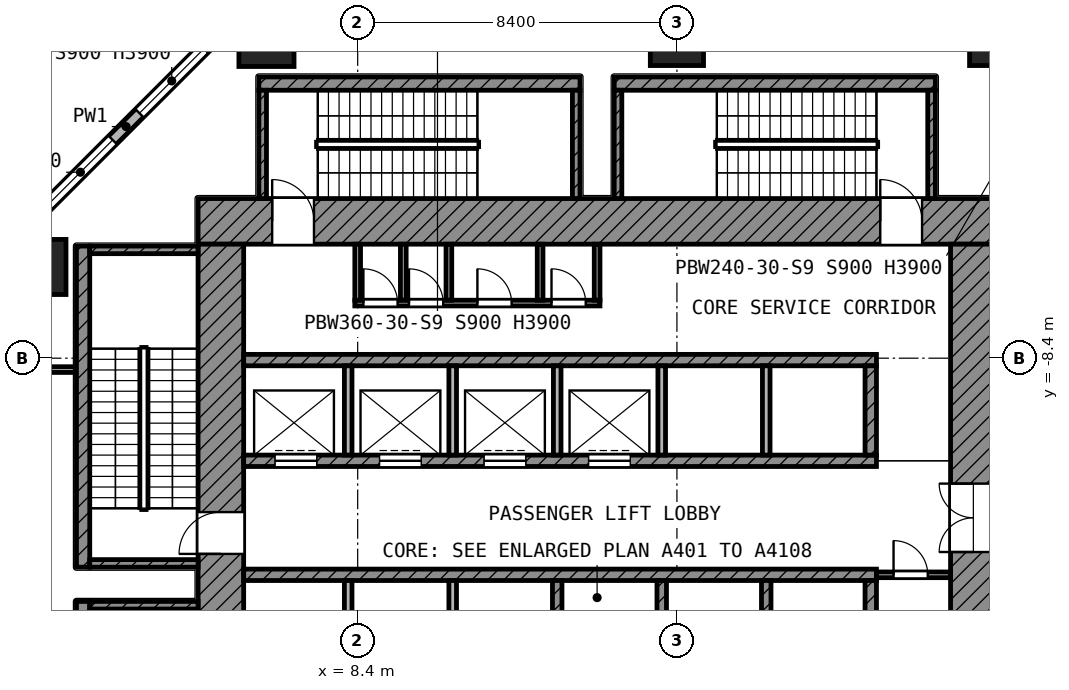
"""IFC4 building model, lengths in metres.
Left out: names, types, materials, properties, quantities, classifications, styles, units other than length and angle.
Written with IfcOpenShell. Run it as: python <this file> out.ifc"""

import sys

from ifc_helpers import new_model, si_unit, direction, frame, frame_2d, origin, origin_2d, place, context, subcontext, project, spatial, rectangle, extrude, element, fill, save


model = new_model("IFC4")
c1 = context("Model", 3, precision=1e-05, world=origin(), true_north=direction((0.0, 1.0)))
c2 = subcontext(c1, "Body", "Model", "MODEL_VIEW")
j1 = project(units=[si_unit("LENGTHUNIT", "METRE"), si_unit("PLANEANGLEUNIT", "RADIAN")], contexts=[c1])
p1 = place(None, origin())
s1 = spatial("IfcSite", under=j1, at=p1, CompositionType="ELEMENT")
p2 = place(p1, origin())
s2 = spatial("IfcBuilding", under=s1, at=p2, CompositionType="ELEMENT")
p3 = place(p2, frame((0.0, 0.0, 7.0)))
s3 = spatial("IfcBuildingStorey", under=s2, at=p3, CompositionType="ELEMENT", Elevation=7.0)
p4 = place(p3, frame((6.0, 0.0, 0.0), z_axis=(0.0, 0.0, 1.0), x_axis=(1.0, 0.0, 0.0)))
e1 = element("IfcColumn", 1, at=p4, inside=s3, PredefinedType="COLUMN", context=c2, shape_type="SweptSolid", body=[
    extrude(rectangle(XDim=1.45, YDim=1.45, at=origin_2d()), origin(), (0.0, 0.0, 1.0), 5.6),
])
for number, where, z_axis, x_axis in (
    (2, (16.8, 0.0, 0.0), (0.0, 0.0, 1.0), (1.0, 0.0, 0.0)),
    (3, (25.2, 0.0, 0.0), (0.0, 0.0, 1.0), (1.0, 0.0, 0.0)),
):
    element("IfcColumn", number, at=place(p3, frame(where, z_axis=z_axis, x_axis=x_axis)), inside=s3, PredefinedType="COLUMN", context=c2, shape_type="SweptSolid", body=[
        extrude(rectangle(XDim=1.4, YDim=1.4, at=origin_2d()), origin(), (0.0, 0.0, 1.0), 5.6),
    ])
p5 = place(p3, frame((0.0, -6.0, 0.0), z_axis=(0.0, 0.0, 1.0), x_axis=(1.0, 0.0, 0.0)))
e4 = element("IfcColumn", 4, at=p5, inside=s3, PredefinedType="COLUMN", context=c2, shape_type="SweptSolid", body=[
    extrude(rectangle(XDim=1.45, YDim=1.45, at=origin_2d()), origin(), (0.0, 0.0, 1.0), 5.6),
])
p6 = place(p3, frame((5.262, 0.65, 0.0), z_axis=(0.0, 0.0, 1.0), x_axis=(-0.707106781187, -0.707106781187, 0.0)))
e5 = element("IfcWall", 5, at=p6, inside=s3, PredefinedType="SOLIDWALL", context=c2, shape_type="SweptSolid", body=[
    extrude(rectangle(XDim=8.361, YDim=0.3, at=frame_2d((4.181, 0.0))), origin(), (0.0, 0.0, 1.0), 5.25),
])
p7 = place(p6, frame((1.282, 0.0, 0.9)))
e6 = element("IfcOpeningElement", 6, at=p7, cuts=e5, PredefinedType="OPENING", context=c2, shape_type="SweptSolid", body=[
    extrude(rectangle(XDim=2.4, YDim=3.0, at=frame_2d((1.2, 1.5))), frame((0.0, 0.16, 0.0), z_axis=(0.0, -1.0, 0.0), x_axis=(1.0, 0.0, 0.0)), (0.0, 0.0, 1.0), 0.32),
])
p8 = place(p6, frame((4.679, 0.0, 0.9)))
e7 = element("IfcOpeningElement", 7, at=p8, cuts=e5, PredefinedType="OPENING", context=c2, shape_type="SweptSolid", body=[
    extrude(rectangle(XDim=2.4, YDim=3.0, at=frame_2d((1.2, 1.5))), frame((0.0, 0.16, 0.0), z_axis=(0.0, -1.0, 0.0), x_axis=(1.0, 0.0, 0.0)), (0.0, 0.0, 1.0), 0.32),
])
p9 = place(p3, frame((4.2, -4.8, 0.0), z_axis=(0.0, 0.0, 1.0), x_axis=(1.0, 0.0, 0.0)))
e8 = element("IfcWall", 8, at=p9, inside=s3, PredefinedType="SHEAR", context=c2, shape_type="SweptSolid", body=[
    extrude(rectangle(XDim=21.0, YDim=1.2, at=frame_2d((10.5, 0.0))), origin(), (0.0, 0.0, 1.0), 5.25),
])
p10 = place(p9, frame((1.95, 0.0, 0.0)))
e9 = element("IfcOpeningElement", 9, at=p10, cuts=e8, PredefinedType="OPENING", context=c2, shape_type="SweptSolid", body=[
    extrude(rectangle(XDim=1.1, YDim=2.1, at=frame_2d((0.55, 1.05))), frame((0.0, 0.61, 0.0), z_axis=(0.0, -1.0, 0.0), x_axis=(1.0, 0.0, 0.0)), (0.0, 0.0, 1.0), 1.22),
])
p11 = place(p9, frame((17.95, 0.0, 0.0)))
e10 = element("IfcOpeningElement", 10, at=p11, cuts=e8, PredefinedType="OPENING", context=c2, shape_type="SweptSolid", body=[
    extrude(rectangle(XDim=1.1, YDim=2.1, at=frame_2d((0.55, 1.05))), frame((0.0, 0.61, 0.0), z_axis=(0.0, -1.0, 0.0), x_axis=(1.0, 0.0, 0.0)), (0.0, 0.0, 1.0), 1.22),
])
p12 = place(p3, frame((4.8, -25.2, 0.0), z_axis=(0.0, 0.0, 1.0), x_axis=(0.0, 1.0, 0.0)))
e11 = element("IfcWall", 11, at=p12, inside=s3, PredefinedType="SHEAR", context=c2, shape_type="SweptSolid", body=[
    extrude(rectangle(XDim=19.8, YDim=1.2, at=frame_2d((9.9, 0.0))), origin(), (0.0, 0.0, 1.0), 5.25),
])
p13 = place(p12, frame((11.65, 0.0, 0.0)))
e12 = element("IfcOpeningElement", 12, at=p13, cuts=e11, PredefinedType="OPENING", context=c2, shape_type="SweptSolid", body=[
    extrude(rectangle(XDim=1.1, YDim=2.1, at=frame_2d((0.55, 1.05))), frame((0.0, 0.61, 0.0), z_axis=(0.0, -1.0, 0.0), x_axis=(1.0, 0.0, 0.0)), (0.0, 0.0, 1.0), 1.22),
])
p14 = place(p12, frame((2.35, 0.0, 0.0)))
e13 = element("IfcOpeningElement", 13, at=p14, cuts=e11, PredefinedType="OPENING", context=c2, shape_type="SweptSolid", body=[
    extrude(rectangle(XDim=1.1, YDim=2.1, at=frame_2d((0.55, 1.05))), frame((0.0, 0.61, 0.0), z_axis=(0.0, -1.0, 0.0), x_axis=(1.0, 0.0, 0.0)), (0.0, 0.0, 1.0), 1.22),
])
p15 = place(p3, frame((24.6, -24.0, 0.0), z_axis=(0.0, 0.0, 1.0), x_axis=(0.0, 1.0, 0.0)))
e14 = element("IfcWall", 14, at=p15, inside=s3, PredefinedType="SHEAR", context=c2, shape_type="SweptSolid", body=[
    extrude(rectangle(XDim=18.6, YDim=1.2, at=frame_2d((9.3, 0.0))), origin(), (0.0, 0.0, 1.0), 5.25),
])
p16 = place(p15, frame((10.5, 0.0, 0.0)))
e15 = element("IfcOpeningElement", 15, at=p16, cuts=e14, PredefinedType="OPENING", context=c2, shape_type="SweptSolid", body=[
    extrude(rectangle(XDim=1.8, YDim=2.1, at=frame_2d((0.9, 1.05))), frame((0.0, 0.61, 0.0), z_axis=(0.0, -1.0, 0.0), x_axis=(1.0, 0.0, 0.0)), (0.0, 0.0, 1.0), 1.22),
])
p17 = place(p3, frame((5.4, -8.45, 0.0), z_axis=(0.0, 0.0, 1.0), x_axis=(1.0, 0.0, 0.0)))
e16 = element("IfcWall", 16, at=p17, inside=s3, PredefinedType="SHEAR", context=c2, shape_type="SweptSolid", body=[
    extrude(rectangle(XDim=16.65, YDim=0.3, at=frame_2d((8.325, 0.0))), origin(), (0.0, 0.0, 1.0), 5.25),
])
p18 = place(p3, frame((5.4, -11.1, 0.0), z_axis=(0.0, 0.0, 1.0), x_axis=(1.0, 0.0, 0.0)))
e17 = element("IfcWall", 17, at=p18, inside=s3, PredefinedType="SHEAR", context=c2, shape_type="SweptSolid", body=[
    extrude(rectangle(XDim=16.65, YDim=0.3, at=frame_2d((8.325, 0.0))), origin(), (0.0, 0.0, 1.0), 5.25),
])
p19 = place(p18, frame((0.825, 0.0, 0.0)))
e18 = element("IfcOpeningElement", 18, at=p19, cuts=e17, PredefinedType="OPENING", context=c2, shape_type="SweptSolid", body=[
    extrude(rectangle(XDim=1.1, YDim=2.1, at=frame_2d((0.55, 1.05))), frame((0.0, 0.16, 0.0), z_axis=(0.0, -1.0, 0.0), x_axis=(1.0, 0.0, 0.0)), (0.0, 0.0, 1.0), 0.32),
])
p20 = place(p18, frame((3.575, 0.0, 0.0)))
e19 = element("IfcOpeningElement", 19, at=p20, cuts=e17, PredefinedType="OPENING", context=c2, shape_type="SweptSolid", body=[
    extrude(rectangle(XDim=1.1, YDim=2.1, at=frame_2d((0.55, 1.05))), frame((0.0, 0.16, 0.0), z_axis=(0.0, -1.0, 0.0), x_axis=(1.0, 0.0, 0.0)), (0.0, 0.0, 1.0), 0.32),
])
p21 = place(p18, frame((6.325, 0.0, 0.0)))
e20 = element("IfcOpeningElement", 20, at=p21, cuts=e17, PredefinedType="OPENING", context=c2, shape_type="SweptSolid", body=[
    extrude(rectangle(XDim=1.1, YDim=2.1, at=frame_2d((0.55, 1.05))), frame((0.0, 0.16, 0.0), z_axis=(0.0, -1.0, 0.0), x_axis=(1.0, 0.0, 0.0)), (0.0, 0.0, 1.0), 0.32),
])
p22 = place(p18, frame((9.075, 0.0, 0.0)))
e21 = element("IfcOpeningElement", 21, at=p22, cuts=e17, PredefinedType="OPENING", context=c2, shape_type="SweptSolid", body=[
    extrude(rectangle(XDim=1.1, YDim=2.1, at=frame_2d((0.55, 1.05))), frame((0.0, 0.16, 0.0), z_axis=(0.0, -1.0, 0.0), x_axis=(1.0, 0.0, 0.0)), (0.0, 0.0, 1.0), 0.32),
])
p23 = place(p3, frame((5.4, -14.1, 0.0), z_axis=(0.0, 0.0, 1.0), x_axis=(1.0, 0.0, 0.0)))
e22 = element("IfcWall", 22, at=p23, inside=s3, PredefinedType="SHEAR", context=c2, shape_type="SweptSolid", body=[
    extrude(rectangle(XDim=16.65, YDim=0.3, at=frame_2d((8.325, 0.0))), origin(), (0.0, 0.0, 1.0), 5.25),
])
p24 = place(p3, frame((21.9, -10.95, 0.0), z_axis=(0.0, 0.0, 1.0), x_axis=(0.0, 1.0, 0.0)))
e23 = element("IfcWall", 23, at=p24, inside=s3, PredefinedType="SHEAR", context=c2, shape_type="SweptSolid", body=[
    extrude(rectangle(XDim=2.35, YDim=0.3, at=frame_2d((1.175, 0.0))), origin(), (0.0, 0.0, 1.0), 5.25),
])
p25 = place(p3, frame((21.9, -16.6, 0.0), z_axis=(0.0, 0.0, 1.0), x_axis=(0.0, 1.0, 0.0)))
e24 = element("IfcWall", 24, at=p25, inside=s3, PredefinedType="SHEAR", context=c2, shape_type="SweptSolid", body=[
    extrude(rectangle(XDim=2.35, YDim=0.3, at=frame_2d((1.175, 0.0))), origin(), (0.0, 0.0, 1.0), 5.25),
])
for number, where, z_axis, x_axis in (
    (25, (8.15, -10.95, 0.0), (0.0, 0.0, 1.0), (0.0, 1.0, 0.0)),
    (26, (10.9, -10.95, 0.0), (0.0, 0.0, 1.0), (0.0, 1.0, 0.0)),
    (27, (13.65, -10.95, 0.0), (0.0, 0.0, 1.0), (0.0, 1.0, 0.0)),
    (28, (16.4, -10.95, 0.0), (0.0, 0.0, 1.0), (0.0, 1.0, 0.0)),
    (29, (19.15, -10.95, 0.0), (0.0, 0.0, 1.0), (0.0, 1.0, 0.0)),
):
    element("IfcWall", number, at=place(p3, frame(where, z_axis=z_axis, x_axis=x_axis)), inside=s3, PredefinedType="PARTITIONING", context=c2, shape_type="SweptSolid", body=[
        extrude(rectangle(XDim=2.35, YDim=0.2, at=frame_2d((1.175, 0.0))), origin(), (0.0, 0.0, 1.0), 5.25),
    ])
for number, where, z_axis, x_axis in (
    (30, (8.15, -16.6, 0.0), (0.0, 0.0, 1.0), (0.0, 1.0, 0.0)),
    (31, (10.9, -16.6, 0.0), (0.0, 0.0, 1.0), (0.0, 1.0, 0.0)),
):
    element("IfcWall", number, at=place(p3, frame(where, z_axis=z_axis, x_axis=x_axis)), inside=s3, PredefinedType="PARTITIONING", context=c2, shape_type="SweptSolid", body=[
        extrude(rectangle(XDim=2.35, YDim=0.2, at=frame_2d((1.175, 0.0))), origin(), (0.0, 0.0, 1.0), 5.25),
    ])
for number, where, z_axis, x_axis in (
    (32, (13.65, -16.6, 0.0), (0.0, 0.0, 1.0), (0.0, 1.0, 0.0)),
    (33, (16.4, -16.6, 0.0), (0.0, 0.0, 1.0), (0.0, 1.0, 0.0)),
    (34, (19.15, -16.6, 0.0), (0.0, 0.0, 1.0), (0.0, 1.0, 0.0)),
):
    element("IfcWall", number, at=place(p3, frame(where, z_axis=z_axis, x_axis=x_axis)), inside=s3, PredefinedType="SHEAR", context=c2, shape_type="SweptSolid", body=[
        extrude(rectangle(XDim=2.35, YDim=0.25, at=frame_2d((1.175, 0.0))), origin(), (0.0, 0.0, 1.0), 5.25),
    ])
p26 = place(p3, frame((22.05, -14.1, 0.0), z_axis=(0.0, 0.0, 1.0), x_axis=(1.0, 0.0, 0.0)))
e35 = element("IfcWall", 35, at=p26, inside=s3, PredefinedType="PARTITIONING", context=c2, shape_type="SweptSolid", body=[
    extrude(rectangle(XDim=1.95, YDim=0.15, at=frame_2d((0.975, 0.0))), origin(), (0.0, 0.0, 1.0), 5.25),
])
p27 = place(p26, frame((0.45, 0.0, 0.0)))
e36 = element("IfcOpeningElement", 36, at=p27, cuts=e35, PredefinedType="OPENING", context=c2, shape_type="SweptSolid", body=[
    extrude(rectangle(XDim=0.9, YDim=2.1, at=frame_2d((0.45, 1.05))), frame((0.0, 0.085, 0.0), z_axis=(0.0, -1.0, 0.0), x_axis=(1.0, 0.0, 0.0)), (0.0, 0.0, 1.0), 0.17),
])
p28 = place(p3, frame((8.325, -6.95, 0.0), z_axis=(0.0, 0.0, 1.0), x_axis=(1.0, 0.0, 0.0)))
e37 = element("IfcWall", 37, at=p28, inside=s3, PredefinedType="PARTITIONING", context=c2, shape_type="SweptSolid", body=[
    extrude(rectangle(XDim=6.45, YDim=0.15, at=frame_2d((3.225, 0.0))), origin(), (0.0, 0.0, 1.0), 5.25),
])
p29 = place(p28, frame((0.225, 0.0, 0.0)))
e38 = element("IfcOpeningElement", 38, at=p29, cuts=e37, PredefinedType="OPENING", context=c2, shape_type="SweptSolid", body=[
    extrude(rectangle(XDim=0.9, YDim=2.1, at=frame_2d((0.45, 1.05))), frame((0.0, 0.085, 0.0), z_axis=(0.0, -1.0, 0.0), x_axis=(1.0, 0.0, 0.0)), (0.0, 0.0, 1.0), 0.17),
])
p30 = place(p28, frame((1.425, 0.0, 0.0)))
e39 = element("IfcOpeningElement", 39, at=p30, cuts=e37, PredefinedType="OPENING", context=c2, shape_type="SweptSolid", body=[
    extrude(rectangle(XDim=0.9, YDim=2.1, at=frame_2d((0.45, 1.05))), frame((0.0, 0.085, 0.0), z_axis=(0.0, -1.0, 0.0), x_axis=(1.0, 0.0, 0.0)), (0.0, 0.0, 1.0), 0.17),
])
p31 = place(p28, frame((3.225, 0.0, 0.0)))
e40 = element("IfcOpeningElement", 40, at=p31, cuts=e37, PredefinedType="OPENING", context=c2, shape_type="SweptSolid", body=[
    extrude(rectangle(XDim=0.9, YDim=2.1, at=frame_2d((0.45, 1.05))), frame((0.0, 0.085, 0.0), z_axis=(0.0, -1.0, 0.0), x_axis=(1.0, 0.0, 0.0)), (0.0, 0.0, 1.0), 0.17),
])
p32 = place(p28, frame((5.175, 0.0, 0.0)))
e41 = element("IfcOpeningElement", 41, at=p32, cuts=e37, PredefinedType="OPENING", context=c2, shape_type="SweptSolid", body=[
    extrude(rectangle(XDim=0.9, YDim=2.1, at=frame_2d((0.45, 1.05))), frame((0.0, 0.085, 0.0), z_axis=(0.0, -1.0, 0.0), x_axis=(1.0, 0.0, 0.0)), (0.0, 0.0, 1.0), 0.17),
])
for number, where, z_axis, x_axis in (
    (42, (8.4, -6.875, 0.0), (0.0, 0.0, 1.0), (0.0, 1.0, 0.0)),
    (43, (9.6, -6.875, 0.0), (0.0, 0.0, 1.0), (0.0, 1.0, 0.0)),
    (44, (10.8, -6.875, 0.0), (0.0, 0.0, 1.0), (0.0, 1.0, 0.0)),
    (45, (13.2, -6.875, 0.0), (0.0, 0.0, 1.0), (0.0, 1.0, 0.0)),
    (46, (14.7, -6.875, 0.0), (0.0, 0.0, 1.0), (0.0, 1.0, 0.0)),
):
    element("IfcWall", number, at=place(p3, frame(where, z_axis=z_axis, x_axis=x_axis)), inside=s3, PredefinedType="PARTITIONING", context=c2, shape_type="SweptSolid", body=[
        extrude(rectangle(XDim=1.475, YDim=0.15, at=frame_2d((0.738, 0.0))), origin(), (0.0, 0.0, 1.0), 5.25),
    ])
p33 = place(p3, frame((1.175, -13.9, 0.0), z_axis=(0.0, 0.0, 1.0), x_axis=(0.0, 1.0, 0.0)))
e47 = element("IfcWall", 47, at=p33, inside=s3, PredefinedType="SHEAR", context=c2, shape_type="SweptSolid", body=[
    extrude(rectangle(XDim=8.45, YDim=0.35, at=frame_2d((4.225, 0.0))), origin(), (0.0, 0.0, 1.0), 5.25),
])
for number, where, z_axis, x_axis in (
    (48, (1.35, -5.55, 0.0), (0.0, 0.0, 1.0), (1.0, 0.0, 0.0)),
    (49, (1.35, -13.8, 0.0), (0.0, 0.0, 1.0), (1.0, 0.0, 0.0)),
):
    element("IfcWall", number, at=place(p3, frame(where, z_axis=z_axis, x_axis=x_axis)), inside=s3, PredefinedType="SHEAR", context=c2, shape_type="SweptSolid", body=[
        extrude(rectangle(XDim=2.85, YDim=0.2, at=frame_2d((1.425, 0.0))), origin(), (0.0, 0.0, 1.0), 5.25),
    ])
p34 = place(p3, frame((1.175, -23.25, 0.0), z_axis=(0.0, 0.0, 1.0), x_axis=(0.0, 1.0, 0.0)))
e50 = element("IfcWall", 50, at=p34, inside=s3, PredefinedType="SHEAR", context=c2, shape_type="SweptSolid", body=[
    extrude(rectangle(XDim=8.45, YDim=0.35, at=frame_2d((4.225, 0.0))), origin(), (0.0, 0.0, 1.0), 5.25),
])
p35 = place(p3, frame((1.35, -14.9, 0.0), z_axis=(0.0, 0.0, 1.0), x_axis=(1.0, 0.0, 0.0)))
e51 = element("IfcWall", 51, at=p35, inside=s3, PredefinedType="SHEAR", context=c2, shape_type="SweptSolid", body=[
    extrude(rectangle(XDim=2.85, YDim=0.2, at=frame_2d((1.425, 0.0))), origin(), (0.0, 0.0, 1.0), 5.25),
])
p36 = place(p3, frame((5.8, -1.175, 0.0), z_axis=(0.0, 0.0, 1.0), x_axis=(1.0, 0.0, 0.0)))
e52 = element("IfcWall", 52, at=p36, inside=s3, PredefinedType="SHEAR", context=c2, shape_type="SweptSolid", body=[
    extrude(rectangle(XDim=8.45, YDim=0.35, at=frame_2d((4.225, 0.0))), origin(), (0.0, 0.0, 1.0), 5.25),
])
for number, where, z_axis, x_axis in (
    (53, (5.9, -4.2, 0.0), (0.0, 0.0, 1.0), (0.0, 1.0, 0.0)),
    (54, (14.15, -4.2, 0.0), (0.0, 0.0, 1.0), (0.0, 1.0, 0.0)),
):
    element("IfcWall", number, at=place(p3, frame(where, z_axis=z_axis, x_axis=x_axis)), inside=s3, PredefinedType="SHEAR", context=c2, shape_type="SweptSolid", body=[
        extrude(rectangle(XDim=2.85, YDim=0.2, at=frame_2d((1.425, 0.0))), origin(), (0.0, 0.0, 1.0), 5.25),
    ])
p37 = place(p3, frame((15.15, -1.175, 0.0), z_axis=(0.0, 0.0, 1.0), x_axis=(1.0, 0.0, 0.0)))
e55 = element("IfcWall", 55, at=p37, inside=s3, PredefinedType="SHEAR", context=c2, shape_type="SweptSolid", body=[
    extrude(rectangle(XDim=8.45, YDim=0.35, at=frame_2d((4.225, 0.0))), origin(), (0.0, 0.0, 1.0), 5.25),
])
for number, where, z_axis, x_axis in (
    (56, (15.25, -4.2, 0.0), (0.0, 0.0, 1.0), (0.0, 1.0, 0.0)),
    (57, (23.5, -4.2, 0.0), (0.0, 0.0, 1.0), (0.0, 1.0, 0.0)),
):
    element("IfcWall", number, at=place(p3, frame(where, z_axis=z_axis, x_axis=x_axis)), inside=s3, PredefinedType="SHEAR", context=c2, shape_type="SweptSolid", body=[
        extrude(rectangle(XDim=2.85, YDim=0.2, at=frame_2d((1.425, 0.0))), origin(), (0.0, 0.0, 1.0), 5.25),
    ])
p38 = place(p3, frame((-0.48, -8.7, 0.0), z_axis=(0.0, 0.0, 1.0), x_axis=(1.0, 0.0, 0.0)))
e58 = element("IfcWall", 58, at=p38, inside=s3, PredefinedType="PARTITIONING", context=c2, shape_type="SweptSolid", body=[
    extrude(rectangle(XDim=1.45, YDim=0.15, at=frame_2d((0.725, 0.0))), origin(), (0.0, 0.0, 1.0), 3.85),
])
p39 = place(p7, origin())
e59 = element("IfcWindow", 59, at=p39, inside=s3, PartitioningType="SINGLE_PANEL", PredefinedType="WINDOW", context=c2, shape_type="SweptSolid", body=[
    extrude(rectangle(XDim=2.4, YDim=3.0, at=frame_2d((1.2, 1.5))), frame((0.0, 0.03, 0.0), z_axis=(0.0, -1.0, 0.0), x_axis=(1.0, 0.0, 0.0)), (0.0, 0.0, 1.0), 0.06),
])
fill(e6, e59)
p40 = place(p8, origin())
e60 = element("IfcWindow", 60, at=p40, inside=s3, PartitioningType="SINGLE_PANEL", PredefinedType="WINDOW", context=c2, shape_type="SweptSolid", body=[
    extrude(rectangle(XDim=2.4, YDim=3.0, at=frame_2d((1.2, 1.5))), frame((0.0, 0.03, 0.0), z_axis=(0.0, -1.0, 0.0), x_axis=(1.0, 0.0, 0.0)), (0.0, 0.0, 1.0), 0.06),
])
fill(e7, e60)
p41 = place(p19, origin())
e61 = element("IfcDoor", 61, at=p41, inside=s3, OperationType="DOUBLE_DOOR_SLIDING", PredefinedType="DOOR", context=c2, shape_type="SweptSolid", body=[
    extrude(rectangle(XDim=1.1, YDim=2.1, at=frame_2d((0.55, 1.05))), frame((0.0, 0.025, 0.0), z_axis=(0.0, -1.0, 0.0), x_axis=(1.0, 0.0, 0.0)), (0.0, 0.0, 1.0), 0.05),
])
fill(e18, e61)
p42 = place(p20, origin())
e62 = element("IfcDoor", 62, at=p42, inside=s3, OperationType="DOUBLE_DOOR_SLIDING", PredefinedType="DOOR", context=c2, shape_type="SweptSolid", body=[
    extrude(rectangle(XDim=1.1, YDim=2.1, at=frame_2d((0.55, 1.05))), frame((0.0, 0.025, 0.0), z_axis=(0.0, -1.0, 0.0), x_axis=(1.0, 0.0, 0.0)), (0.0, 0.0, 1.0), 0.05),
])
fill(e19, e62)
p43 = place(p21, origin())
e63 = element("IfcDoor", 63, at=p43, inside=s3, OperationType="DOUBLE_DOOR_SLIDING", PredefinedType="DOOR", context=c2, shape_type="SweptSolid", body=[
    extrude(rectangle(XDim=1.1, YDim=2.1, at=frame_2d((0.55, 1.05))), frame((0.0, 0.025, 0.0), z_axis=(0.0, -1.0, 0.0), x_axis=(1.0, 0.0, 0.0)), (0.0, 0.0, 1.0), 0.05),
])
fill(e20, e63)
p44 = place(p22, origin())
e64 = element("IfcDoor", 64, at=p44, inside=s3, OperationType="DOUBLE_DOOR_SLIDING", PredefinedType="DOOR", context=c2, shape_type="SweptSolid", body=[
    extrude(rectangle(XDim=1.1, YDim=2.1, at=frame_2d((0.55, 1.05))), frame((0.0, 0.025, 0.0), z_axis=(0.0, -1.0, 0.0), x_axis=(1.0, 0.0, 0.0)), (0.0, 0.0, 1.0), 0.05),
])
fill(e21, e64)
p45 = place(p13, origin())
e65 = element("IfcDoor", 65, at=p45, inside=s3, OperationType="SINGLE_SWING_LEFT", PredefinedType="DOOR", context=c2, shape_type="SweptSolid", body=[
    extrude(rectangle(XDim=1.1, YDim=2.1, at=frame_2d((0.55, 1.05))), frame((0.0, 0.025, 0.0), z_axis=(0.0, -1.0, 0.0), x_axis=(1.0, 0.0, 0.0)), (0.0, 0.0, 1.0), 0.05),
])
fill(e12, e65)
p46 = place(p10, origin())
e66 = element("IfcDoor", 66, at=p46, inside=s3, OperationType="SINGLE_SWING_LEFT", PredefinedType="DOOR", context=c2, shape_type="SweptSolid", body=[
    extrude(rectangle(XDim=1.1, YDim=2.1, at=frame_2d((0.55, 1.05))), frame((0.0, 0.025, 0.0), z_axis=(0.0, -1.0, 0.0), x_axis=(1.0, 0.0, 0.0)), (0.0, 0.0, 1.0), 0.05),
])
fill(e9, e66)
p47 = place(p11, origin())
e67 = element("IfcDoor", 67, at=p47, inside=s3, OperationType="SINGLE_SWING_LEFT", PredefinedType="DOOR", context=c2, shape_type="SweptSolid", body=[
    extrude(rectangle(XDim=1.1, YDim=2.1, at=frame_2d((0.55, 1.05))), frame((0.0, 0.025, 0.0), z_axis=(0.0, -1.0, 0.0), x_axis=(1.0, 0.0, 0.0)), (0.0, 0.0, 1.0), 0.05),
])
fill(e10, e67)
p48 = place(p16, origin())
e68 = element("IfcDoor", 68, at=p48, inside=s3, OperationType="DOUBLE_DOOR_SINGLE_SWING", PredefinedType="DOOR", context=c2, shape_type="SweptSolid", body=[
    extrude(rectangle(XDim=1.8, YDim=2.1, at=frame_2d((0.9, 1.05))), frame((0.0, 0.025, 0.0), z_axis=(0.0, -1.0, 0.0), x_axis=(1.0, 0.0, 0.0)), (0.0, 0.0, 1.0), 0.05),
])
fill(e15, e68)
p49 = place(p29, origin())
e69 = element("IfcDoor", 69, at=p49, inside=s3, OperationType="SINGLE_SWING_LEFT", PredefinedType="DOOR", context=c2, shape_type="SweptSolid", body=[
    extrude(rectangle(XDim=0.9, YDim=2.1, at=frame_2d((0.45, 1.05))), frame((0.0, 0.025, 0.0), z_axis=(0.0, -1.0, 0.0), x_axis=(1.0, 0.0, 0.0)), (0.0, 0.0, 1.0), 0.05),
])
fill(e38, e69)
p50 = place(p30, origin())
e70 = element("IfcDoor", 70, at=p50, inside=s3, OperationType="SINGLE_SWING_LEFT", PredefinedType="DOOR", context=c2, shape_type="SweptSolid", body=[
    extrude(rectangle(XDim=0.9, YDim=2.1, at=frame_2d((0.45, 1.05))), frame((0.0, 0.025, 0.0), z_axis=(0.0, -1.0, 0.0), x_axis=(1.0, 0.0, 0.0)), (0.0, 0.0, 1.0), 0.05),
])
fill(e39, e70)
p51 = place(p31, origin())
e71 = element("IfcDoor", 71, at=p51, inside=s3, OperationType="SINGLE_SWING_LEFT", PredefinedType="DOOR", context=c2, shape_type="SweptSolid", body=[
    extrude(rectangle(XDim=0.9, YDim=2.1, at=frame_2d((0.45, 1.05))), frame((0.0, 0.025, 0.0), z_axis=(0.0, -1.0, 0.0), x_axis=(1.0, 0.0, 0.0)), (0.0, 0.0, 1.0), 0.05),
])
fill(e40, e71)
p52 = place(p32, origin())
e72 = element("IfcDoor", 72, at=p52, inside=s3, OperationType="SINGLE_SWING_LEFT", PredefinedType="DOOR", context=c2, shape_type="SweptSolid", body=[
    extrude(rectangle(XDim=0.9, YDim=2.1, at=frame_2d((0.45, 1.05))), frame((0.0, 0.025, 0.0), z_axis=(0.0, -1.0, 0.0), x_axis=(1.0, 0.0, 0.0)), (0.0, 0.0, 1.0), 0.05),
])
fill(e41, e72)
p53 = place(p27, origin())
e73 = element("IfcDoor", 73, at=p53, inside=s3, OperationType="SINGLE_SWING_LEFT", PredefinedType="DOOR", context=c2, shape_type="SweptSolid", body=[
    extrude(rectangle(XDim=0.9, YDim=2.1, at=frame_2d((0.45, 1.05))), frame((0.0, 0.025, 0.0), z_axis=(0.0, -1.0, 0.0), x_axis=(1.0, 0.0, 0.0)), (0.0, 0.0, 1.0), 0.05),
])
fill(e36, e73)
save(model, sys.argv[1])
